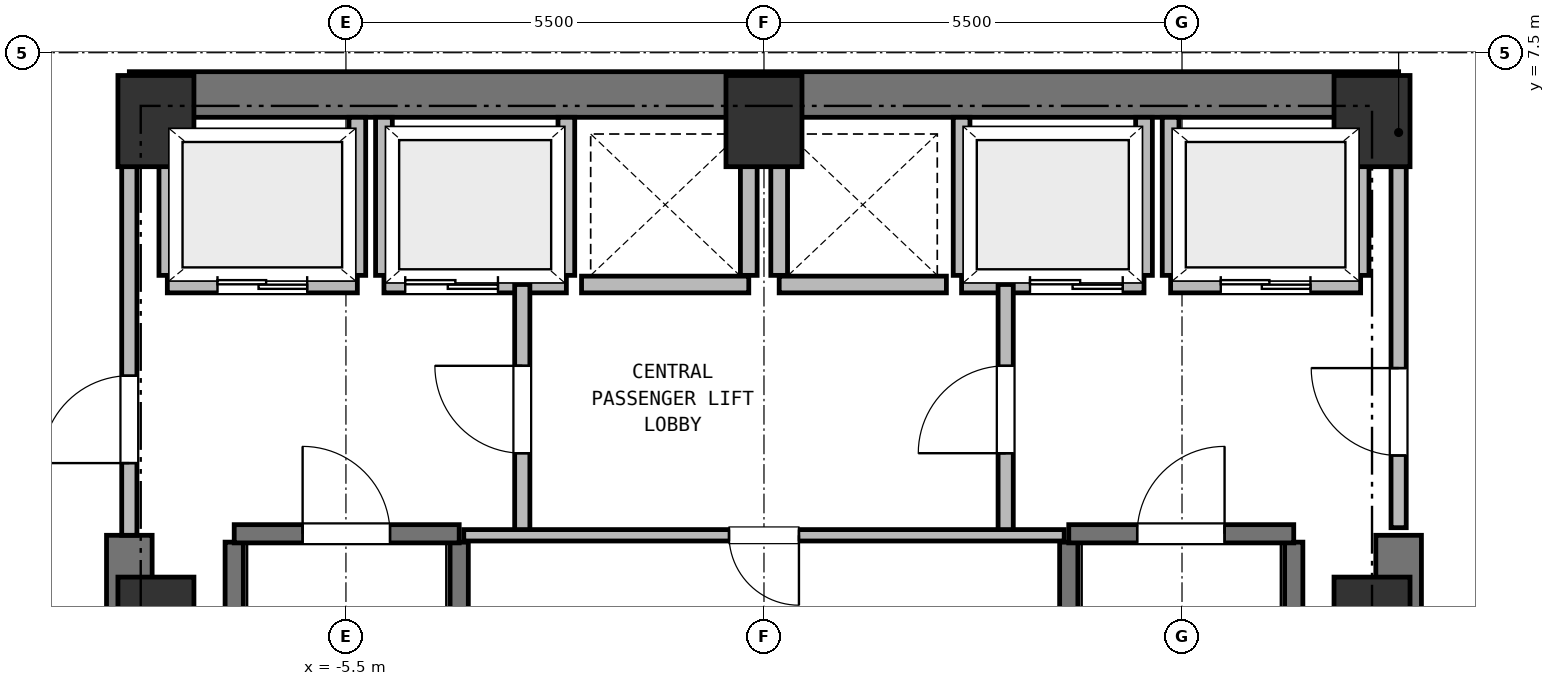
"""IFC4 building model, lengths in metres.
Left out: names, types, materials, properties, quantities, classifications, styles, units other than length and angle.
Written with IfcOpenShell. Run it as: python <this file> out.ifc"""

import sys

from ifc_helpers import new_model, si_unit, direction, frame, frame_2d, origin, origin_2d, place, context, subcontext, project, spatial, rectangle, extrude, element, fill, save


model = new_model("IFC4")
c1 = context("Model", 3, precision=1e-05, world=origin(), true_north=direction((0.0, 1.0)))
c2 = subcontext(c1, "Body", "Model", "MODEL_VIEW")
j1 = project(units=[si_unit("LENGTHUNIT", "METRE"), si_unit("PLANEANGLEUNIT", "RADIAN")], contexts=[c1])
p1 = place(None, origin())
s1 = spatial("IfcSite", under=j1, at=p1, CompositionType="ELEMENT")
p2 = place(p1, origin())
s2 = spatial("IfcBuilding", under=s1, at=p2, CompositionType="ELEMENT")
p3 = place(p2, frame((0.0, 0.0, 92.75)))
s3 = spatial("IfcBuildingStorey", under=s2, at=p3, CompositionType="ELEMENT", Elevation=92.75)
for number, where, z_axis, x_axis in (
    (1, (8.0, 0.0, 0.0), (0.0, 0.0, 1.0), (1.0, 0.0, 0.0)),
    (2, (8.0, 6.6, 0.0), (0.0, 0.0, 1.0), (1.0, 0.0, 0.0)),
    (3, (0.0, 6.6, 0.0), (0.0, 0.0, 1.0), (1.0, 0.0, 0.0)),
    (4, (-8.0, 6.6, 0.0), (0.0, 0.0, 1.0), (1.0, 0.0, 0.0)),
    (5, (-8.0, 0.0, 0.0), (0.0, 0.0, 1.0), (1.0, 0.0, 0.0)),
):
    element("IfcColumn", number, at=place(p3, frame(where, z_axis=z_axis, x_axis=x_axis)), inside=s3, PredefinedType="COLUMN", context=c2, shape_type="SweptSolid", body=[
        extrude(rectangle(XDim=1.0, YDim=1.2, at=origin_2d()), origin(), (0.0, 0.0, 1.0), 4.5),
    ])
p4 = place(p3, frame((-8.35, 6.95, 0.0), z_axis=(0.0, 0.0, 1.0), x_axis=(1.0, 0.0, 0.0)))
e6 = element("IfcWall", 6, at=p4, inside=s3, PredefinedType="SHEAR", context=c2, shape_type="SweptSolid", body=[
    extrude(rectangle(XDim=16.7, YDim=0.6, at=frame_2d((8.35, 0.0))), origin(), (0.0, 0.0, 1.0), 4.25),
])
for number, where, z_axis, x_axis in (
    (7, (-8.35, -6.95, 0.0), (0.0, 0.0, 1.0), (0.0, 1.0, 0.0)),
    (8, (8.35, -6.95, 0.0), (0.0, 0.0, 1.0), (0.0, 1.0, 0.0)),
):
    element("IfcWall", number, at=place(p3, frame(where, z_axis=z_axis, x_axis=x_axis)), inside=s3, PredefinedType="SHEAR", context=c2, shape_type="SweptSolid", body=[
        extrude(rectangle(XDim=8.1, YDim=0.6, at=frame_2d((4.05, 0.0))), origin(), (0.0, 0.0, 1.0), 4.25),
    ])
for number, where, z_axis, x_axis in (
    (9, (-6.97, -6.16, 0.0), (0.0, 0.0, 1.0), (0.0, 1.0, 0.0)),
    (10, (-4.01, -6.16, 0.0), (0.0, 0.0, 1.0), (0.0, 1.0, 0.0)),
):
    element("IfcWall", number, at=place(p3, frame(where, z_axis=z_axis, x_axis=x_axis)), inside=s3, PredefinedType="SHEAR", context=c2, shape_type="SweptSolid", body=[
        extrude(rectangle(XDim=7.22, YDim=0.24, at=frame_2d((3.61, 0.0))), origin(), (0.0, 0.0, 1.0), 4.25),
    ])
p5 = place(p3, frame((-6.97, 1.17, 0.0), z_axis=(0.0, 0.0, 1.0), x_axis=(1.0, 0.0, 0.0)))
e11 = element("IfcWall", 11, at=p5, inside=s3, PredefinedType="SHEAR", context=c2, shape_type="SweptSolid", body=[
    extrude(rectangle(XDim=2.96, YDim=0.24, at=frame_2d((1.48, 0.0))), origin(), (0.0, 0.0, 1.0), 4.25),
])
p6 = place(p5, frame((0.9, 0.0, 0.0)))
e12 = element("IfcOpeningElement", 12, at=p6, cuts=e11, PredefinedType="OPENING", context=c2, shape_type="SweptSolid", body=[
    extrude(rectangle(XDim=1.15, YDim=2.15, at=frame_2d((0.575, 1.075))), frame((0.0, 0.13, 0.0), z_axis=(0.0, -1.0, 0.0), x_axis=(1.0, 0.0, 0.0)), (0.0, 0.0, 1.0), 0.26),
])
for number, where, z_axis, x_axis in (
    (13, (4.01, -6.16, 0.0), (0.0, 0.0, 1.0), (0.0, 1.0, 0.0)),
    (14, (6.97, -6.16, 0.0), (0.0, 0.0, 1.0), (0.0, 1.0, 0.0)),
):
    element("IfcWall", number, at=place(p3, frame(where, z_axis=z_axis, x_axis=x_axis)), inside=s3, PredefinedType="SHEAR", context=c2, shape_type="SweptSolid", body=[
        extrude(rectangle(XDim=7.22, YDim=0.24, at=frame_2d((3.61, 0.0))), origin(), (0.0, 0.0, 1.0), 4.25),
    ])
p7 = place(p3, frame((4.01, 1.17, 0.0), z_axis=(0.0, 0.0, 1.0), x_axis=(1.0, 0.0, 0.0)))
e15 = element("IfcWall", 15, at=p7, inside=s3, PredefinedType="SHEAR", context=c2, shape_type="SweptSolid", body=[
    extrude(rectangle(XDim=2.96, YDim=0.24, at=frame_2d((1.48, 0.0))), origin(), (0.0, 0.0, 1.0), 4.25),
])
p8 = place(p7, frame((0.9, 0.0, 0.0)))
e16 = element("IfcOpeningElement", 16, at=p8, cuts=e15, PredefinedType="OPENING", context=c2, shape_type="SweptSolid", body=[
    extrude(rectangle(XDim=1.15, YDim=2.15, at=frame_2d((0.575, 1.075))), frame((0.0, 0.13, 0.0), z_axis=(0.0, -1.0, 0.0), x_axis=(1.0, 0.0, 0.0)), (0.0, 0.0, 1.0), 0.26),
])
p9 = place(p3, frame((-7.85, 4.45, 0.0), z_axis=(0.0, 0.0, 1.0), x_axis=(1.0, 0.0, 0.0)))
e17 = element("IfcWall", 17, at=p9, inside=s3, PredefinedType="PARTITIONING", context=c2, shape_type="SweptSolid", body=[
    extrude(rectangle(XDim=2.5, YDim=0.22, at=frame_2d((1.25, 0.0))), origin(), (0.0, 0.0, 1.0), 4.25),
])
p10 = place(p9, frame((0.66, 0.0, 0.0)))
e18 = element("IfcOpeningElement", 18, at=p10, cuts=e17, PredefinedType="OPENING", context=c2, shape_type="SweptSolid", body=[
    extrude(rectangle(XDim=1.18, YDim=2.15, at=frame_2d((0.59, 1.075))), frame((0.0, 0.12, 0.0), z_axis=(0.0, -1.0, 0.0), x_axis=(1.0, 0.0, 0.0)), (0.0, 0.0, 1.0), 0.24),
])
p11 = place(p3, frame((-7.85, 4.57, 0.0), z_axis=(0.0, 0.0, 1.0), x_axis=(0.0, 1.0, 0.0)))
e19 = element("IfcWall", 19, at=p11, inside=s3, PredefinedType="PARTITIONING", context=c2, shape_type="SweptSolid", body=[
    extrude(rectangle(XDim=2.08, YDim=0.22, at=frame_2d((1.04, 0.0))), origin(), (0.0, 0.0, 1.0), 3.87),
])
p12 = place(p3, frame((-5.35, 4.57, 0.0), z_axis=(0.0, 0.0, 1.0), x_axis=(0.0, 1.0, 0.0)))
e20 = element("IfcWall", 20, at=p12, inside=s3, PredefinedType="PARTITIONING", context=c2, shape_type="SweptSolid", body=[
    extrude(rectangle(XDim=2.08, YDim=0.22, at=frame_2d((1.04, 0.0))), origin(), (0.0, 0.0, 1.0), 4.25),
])
p13 = place(p3, frame((5.35, 4.45, 0.0), z_axis=(0.0, 0.0, 1.0), x_axis=(1.0, 0.0, 0.0)))
e21 = element("IfcWall", 21, at=p13, inside=s3, PredefinedType="PARTITIONING", context=c2, shape_type="SweptSolid", body=[
    extrude(rectangle(XDim=2.5, YDim=0.22, at=frame_2d((1.25, 0.0))), origin(), (0.0, 0.0, 1.0), 4.25),
])
p14 = place(p13, frame((0.66, 0.0, 0.0)))
e22 = element("IfcOpeningElement", 22, at=p14, cuts=e21, PredefinedType="OPENING", context=c2, shape_type="SweptSolid", body=[
    extrude(rectangle(XDim=1.18, YDim=2.15, at=frame_2d((0.59, 1.075))), frame((0.0, 0.12, 0.0), z_axis=(0.0, -1.0, 0.0), x_axis=(1.0, 0.0, 0.0)), (0.0, 0.0, 1.0), 0.24),
])
p15 = place(p3, frame((5.35, 4.57, 0.0), z_axis=(0.0, 0.0, 1.0), x_axis=(0.0, 1.0, 0.0)))
e23 = element("IfcWall", 23, at=p15, inside=s3, PredefinedType="PARTITIONING", context=c2, shape_type="SweptSolid", body=[
    extrude(rectangle(XDim=2.08, YDim=0.22, at=frame_2d((1.04, 0.0))), origin(), (0.0, 0.0, 1.0), 4.25),
])
p16 = place(p3, frame((7.85, 4.57, 0.0), z_axis=(0.0, 0.0, 1.0), x_axis=(0.0, 1.0, 0.0)))
e24 = element("IfcWall", 24, at=p16, inside=s3, PredefinedType="PARTITIONING", context=c2, shape_type="SweptSolid", body=[
    extrude(rectangle(XDim=2.08, YDim=0.22, at=frame_2d((1.04, 0.0))), origin(), (0.0, 0.0, 1.0), 3.87),
])
p17 = place(p3, frame((-5.0, 4.45, 0.0), z_axis=(0.0, 0.0, 1.0), x_axis=(1.0, 0.0, 0.0)))
e25 = element("IfcWall", 25, at=p17, inside=s3, PredefinedType="PARTITIONING", context=c2, shape_type="SweptSolid", body=[
    extrude(rectangle(XDim=2.4, YDim=0.22, at=frame_2d((1.2, 0.0))), origin(), (0.0, 0.0, 1.0), 4.25),
])
p18 = place(p17, frame((0.28, 0.0, 0.0)))
e26 = element("IfcOpeningElement", 26, at=p18, cuts=e25, PredefinedType="OPENING", context=c2, shape_type="SweptSolid", body=[
    extrude(rectangle(XDim=1.22, YDim=2.15, at=frame_2d((0.61, 1.075))), frame((0.0, 0.12, 0.0), z_axis=(0.0, -1.0, 0.0), x_axis=(1.0, 0.0, 0.0)), (0.0, 0.0, 1.0), 0.24),
])
for number, where, z_axis, x_axis in (
    (27, (-5.0, 4.57, 0.0), (0.0, 0.0, 1.0), (0.0, 1.0, 0.0)),
    (28, (-2.6, 4.57, 0.0), (0.0, 0.0, 1.0), (0.0, 1.0, 0.0)),
):
    element("IfcWall", number, at=place(p3, frame(where, z_axis=z_axis, x_axis=x_axis)), inside=s3, PredefinedType="PARTITIONING", context=c2, shape_type="SweptSolid", body=[
        extrude(rectangle(XDim=2.08, YDim=0.22, at=frame_2d((1.04, 0.0))), origin(), (0.0, 0.0, 1.0), 4.25),
    ])
p19 = place(p3, frame((2.6, 4.45, 0.0), z_axis=(0.0, 0.0, 1.0), x_axis=(1.0, 0.0, 0.0)))
e29 = element("IfcWall", 29, at=p19, inside=s3, PredefinedType="PARTITIONING", context=c2, shape_type="SweptSolid", body=[
    extrude(rectangle(XDim=2.4, YDim=0.22, at=frame_2d((1.2, 0.0))), origin(), (0.0, 0.0, 1.0), 4.25),
])
p20 = place(p19, frame((0.9, 0.0, 0.0)))
e30 = element("IfcOpeningElement", 30, at=p20, cuts=e29, PredefinedType="OPENING", context=c2, shape_type="SweptSolid", body=[
    extrude(rectangle(XDim=1.22, YDim=2.15, at=frame_2d((0.61, 1.075))), frame((0.0, 0.12, 0.0), z_axis=(0.0, -1.0, 0.0), x_axis=(1.0, 0.0, 0.0)), (0.0, 0.0, 1.0), 0.24),
])
for number, where, z_axis, x_axis in (
    (31, (2.6, 4.57, 0.0), (0.0, 0.0, 1.0), (0.0, 1.0, 0.0)),
    (32, (5.0, 4.57, 0.0), (0.0, 0.0, 1.0), (0.0, 1.0, 0.0)),
):
    element("IfcWall", number, at=place(p3, frame(where, z_axis=z_axis, x_axis=x_axis)), inside=s3, PredefinedType="PARTITIONING", context=c2, shape_type="SweptSolid", body=[
        extrude(rectangle(XDim=2.08, YDim=0.22, at=frame_2d((1.04, 0.0))), origin(), (0.0, 0.0, 1.0), 4.25),
    ])
p21 = place(p3, frame((-2.4, 4.45, 0.0), z_axis=(0.0, 0.0, 1.0), x_axis=(1.0, 0.0, 0.0)))
e33 = element("IfcWall", 33, at=p21, inside=s3, PredefinedType="PARTITIONING", context=c2, shape_type="SweptSolid", body=[
    extrude(rectangle(XDim=2.2, YDim=0.22, at=frame_2d((1.1, 0.0))), origin(), (0.0, 0.0, 1.0), 4.25),
])
p22 = place(p3, frame((-0.2, 4.57, 0.0), z_axis=(0.0, 0.0, 1.0), x_axis=(0.0, 1.0, 0.0)))
e34 = element("IfcWall", 34, at=p22, inside=s3, PredefinedType="PARTITIONING", context=c2, shape_type="SweptSolid", body=[
    extrude(rectangle(XDim=2.08, YDim=0.22, at=frame_2d((1.04, 0.0))), origin(), (0.0, 0.0, 1.0), 4.25),
])
p23 = place(p3, frame((0.2, 4.45, 0.0), z_axis=(0.0, 0.0, 1.0), x_axis=(1.0, 0.0, 0.0)))
e35 = element("IfcWall", 35, at=p23, inside=s3, PredefinedType="PARTITIONING", context=c2, shape_type="SweptSolid", body=[
    extrude(rectangle(XDim=2.2, YDim=0.22, at=frame_2d((1.1, 0.0))), origin(), (0.0, 0.0, 1.0), 4.25),
])
p24 = place(p3, frame((0.2, 4.57, 0.0), z_axis=(0.0, 0.0, 1.0), x_axis=(0.0, 1.0, 0.0)))
e36 = element("IfcWall", 36, at=p24, inside=s3, PredefinedType="PARTITIONING", context=c2, shape_type="SweptSolid", body=[
    extrude(rectangle(XDim=2.08, YDim=0.22, at=frame_2d((1.04, 0.0))), origin(), (0.0, 0.0, 1.0), 4.25),
])
p25 = place(p3, frame((-3.18, 1.15, 0.0), z_axis=(0.0, 0.0, 1.0), x_axis=(0.0, 1.0, 0.0)))
e37 = element("IfcWall", 37, at=p25, inside=s3, PredefinedType="PARTITIONING", context=c2, shape_type="SweptSolid", body=[
    extrude(rectangle(XDim=3.3, YDim=0.2, at=frame_2d((1.65, 0.0))), origin(), (0.0, 0.0, 1.0), 4.25),
])
p26 = place(p25, frame((1.08, 0.0, 0.0)))
e38 = element("IfcOpeningElement", 38, at=p26, cuts=e37, PredefinedType="OPENING", context=c2, shape_type="SweptSolid", body=[
    extrude(rectangle(XDim=1.15, YDim=2.15, at=frame_2d((0.575, 1.075))), frame((0.0, 0.11, 0.0), z_axis=(0.0, -1.0, 0.0), x_axis=(1.0, 0.0, 0.0)), (0.0, 0.0, 1.0), 0.22),
])
p27 = place(p3, frame((3.18, 1.15, 0.0), z_axis=(0.0, 0.0, 1.0), x_axis=(0.0, 1.0, 0.0)))
e39 = element("IfcWall", 39, at=p27, inside=s3, PredefinedType="PARTITIONING", context=c2, shape_type="SweptSolid", body=[
    extrude(rectangle(XDim=3.3, YDim=0.2, at=frame_2d((1.65, 0.0))), origin(), (0.0, 0.0, 1.0), 4.25),
])
p28 = place(p27, frame((1.08, 0.0, 0.0)))
e40 = element("IfcOpeningElement", 40, at=p28, cuts=e39, PredefinedType="OPENING", context=c2, shape_type="SweptSolid", body=[
    extrude(rectangle(XDim=1.15, YDim=2.15, at=frame_2d((0.575, 1.075))), frame((0.0, 0.11, 0.0), z_axis=(0.0, -1.0, 0.0), x_axis=(1.0, 0.0, 0.0)), (0.0, 0.0, 1.0), 0.22),
])
p29 = place(p3, frame((-8.35, 1.15, 0.0), z_axis=(0.0, 0.0, 1.0), x_axis=(0.0, 1.0, 0.0)))
e41 = element("IfcWall", 41, at=p29, inside=s3, PredefinedType="PARTITIONING", context=c2, shape_type="SweptSolid", body=[
    extrude(rectangle(XDim=5.4, YDim=0.2, at=frame_2d((2.7, 0.0))), origin(), (0.0, 0.0, 1.0), 4.25),
])
p30 = place(p29, frame((0.95, 0.0, 0.0)))
e42 = element("IfcOpeningElement", 42, at=p30, cuts=e41, PredefinedType="OPENING", context=c2, shape_type="SweptSolid", body=[
    extrude(rectangle(XDim=1.15, YDim=2.15, at=frame_2d((0.575, 1.075))), frame((0.0, 0.11, 0.0), z_axis=(0.0, -1.0, 0.0), x_axis=(1.0, 0.0, 0.0)), (0.0, 0.0, 1.0), 0.22),
])
p31 = place(p3, frame((8.35, 1.25, 0.0), z_axis=(0.0, 0.0, 1.0), x_axis=(0.0, 1.0, 0.0)))
e43 = element("IfcWall", 43, at=p31, inside=s3, PredefinedType="PARTITIONING", context=c2, shape_type="SweptSolid", body=[
    extrude(rectangle(XDim=5.3, YDim=0.2, at=frame_2d((2.65, 0.0))), origin(), (0.0, 0.0, 1.0), 4.25),
])
p32 = place(p31, frame((0.95, 0.0, 0.0)))
e44 = element("IfcOpeningElement", 44, at=p32, cuts=e43, PredefinedType="OPENING", context=c2, shape_type="SweptSolid", body=[
    extrude(rectangle(XDim=1.15, YDim=2.15, at=frame_2d((0.575, 1.075))), frame((0.0, 0.11, 0.0), z_axis=(0.0, -1.0, 0.0), x_axis=(1.0, 0.0, 0.0)), (0.0, 0.0, 1.0), 0.22),
])
p33 = place(p3, frame((3.95, 1.15, 0.0), z_axis=(0.0, 0.0, 1.0), x_axis=(-1.0, 0.0, 0.0)))
e45 = element("IfcWall", 45, at=p33, inside=s3, PredefinedType="PARTITIONING", context=c2, shape_type="SweptSolid", body=[
    extrude(rectangle(XDim=7.9, YDim=0.15, at=frame_2d((3.95, 0.0))), origin(), (0.0, 0.0, 1.0), 4.25),
])
p34 = place(p33, frame((3.49, 0.0, 0.0)))
e46 = element("IfcOpeningElement", 46, at=p34, cuts=e45, PredefinedType="OPENING", context=c2, shape_type="SweptSolid", body=[
    extrude(rectangle(XDim=0.92, YDim=2.05, at=frame_2d((0.46, 1.025))), frame((0.0, 0.085, 0.0), z_axis=(0.0, -1.0, 0.0), x_axis=(1.0, 0.0, 0.0)), (0.0, 0.0, 1.0), 0.17),
])
for number, where, z_axis, x_axis in (
    (47, (8.678, 9.272, 0.0), (0.0, 0.0, 1.0), (0.707, -0.707, 0.0)),
    (48, (-10.722, 7.228, 0.0), (0.0, 0.0, 1.0), (0.707, 0.707, 0.0)),
):
    element("IfcWall", number, at=place(p3, frame(where, z_axis=z_axis, x_axis=x_axis)), inside=s3, PredefinedType="PARTITIONING", context=c2, shape_type="SweptSolid", body=[
        extrude(rectangle(XDim=2.89, YDim=0.15, at=frame_2d((1.445, 0.0))), origin(), (0.0, 0.0, 1.0), 4.25),
    ])
p35 = place(p6, origin())
e49 = element("IfcDoor", 49, at=p35, inside=s3, OperationType="SINGLE_SWING_LEFT", PredefinedType="DOOR", context=c2, shape_type="SweptSolid", body=[
    extrude(rectangle(XDim=1.15, YDim=2.15, at=frame_2d((0.575, 1.075))), frame((0.0, 0.025, 0.0), z_axis=(0.0, -1.0, 0.0), x_axis=(1.0, 0.0, 0.0)), (0.0, 0.0, 1.0), 0.05),
])
fill(e12, e49)
p36 = place(p8, origin())
e50 = element("IfcDoor", 50, at=p36, inside=s3, OperationType="SINGLE_SWING_RIGHT", PredefinedType="DOOR", context=c2, shape_type="SweptSolid", body=[
    extrude(rectangle(XDim=1.15, YDim=2.15, at=frame_2d((0.575, 1.075))), frame((0.0, 0.025, 0.0), z_axis=(0.0, -1.0, 0.0), x_axis=(1.0, 0.0, 0.0)), (0.0, 0.0, 1.0), 0.05),
])
fill(e16, e50)
p37 = place(p10, origin())
e51 = element("IfcDoor", 51, at=p37, inside=s3, OperationType="DOUBLE_DOOR_SLIDING", PredefinedType="DOOR", context=c2, shape_type="SweptSolid", body=[
    extrude(rectangle(XDim=1.18, YDim=2.15, at=frame_2d((0.59, 1.075))), frame((0.0, 0.025, 0.0), z_axis=(0.0, -1.0, 0.0), x_axis=(1.0, 0.0, 0.0)), (0.0, 0.0, 1.0), 0.05),
])
fill(e18, e51)
p38 = place(p14, origin())
e52 = element("IfcDoor", 52, at=p38, inside=s3, OperationType="DOUBLE_DOOR_SLIDING", PredefinedType="DOOR", context=c2, shape_type="SweptSolid", body=[
    extrude(rectangle(XDim=1.18, YDim=2.15, at=frame_2d((0.59, 1.075))), frame((0.0, 0.025, 0.0), z_axis=(0.0, -1.0, 0.0), x_axis=(1.0, 0.0, 0.0)), (0.0, 0.0, 1.0), 0.05),
])
fill(e22, e52)
p39 = place(p18, origin())
e53 = element("IfcDoor", 53, at=p39, inside=s3, OperationType="DOUBLE_DOOR_SLIDING", PredefinedType="DOOR", context=c2, shape_type="SweptSolid", body=[
    extrude(rectangle(XDim=1.22, YDim=2.15, at=frame_2d((0.61, 1.075))), frame((0.0, 0.025, 0.0), z_axis=(0.0, -1.0, 0.0), x_axis=(1.0, 0.0, 0.0)), (0.0, 0.0, 1.0), 0.05),
])
fill(e26, e53)
p40 = place(p20, origin())
e54 = element("IfcDoor", 54, at=p40, inside=s3, OperationType="DOUBLE_DOOR_SLIDING", PredefinedType="DOOR", context=c2, shape_type="SweptSolid", body=[
    extrude(rectangle(XDim=1.22, YDim=2.15, at=frame_2d((0.61, 1.075))), frame((0.0, 0.025, 0.0), z_axis=(0.0, -1.0, 0.0), x_axis=(1.0, 0.0, 0.0)), (0.0, 0.0, 1.0), 0.05),
])
fill(e30, e54)
p41 = place(p26, origin())
e55 = element("IfcDoor", 55, at=p41, inside=s3, OperationType="SINGLE_SWING_RIGHT", PredefinedType="DOOR", context=c2, shape_type="SweptSolid", body=[
    extrude(rectangle(XDim=1.15, YDim=2.15, at=frame_2d((0.575, 1.075))), frame((0.0, 0.025, 0.0), z_axis=(0.0, -1.0, 0.0), x_axis=(1.0, 0.0, 0.0)), (0.0, 0.0, 1.0), 0.05),
])
fill(e38, e55)
p42 = place(p28, origin())
e56 = element("IfcDoor", 56, at=p42, inside=s3, OperationType="SINGLE_SWING_LEFT", PredefinedType="DOOR", context=c2, shape_type="SweptSolid", body=[
    extrude(rectangle(XDim=1.15, YDim=2.15, at=frame_2d((0.575, 1.075))), frame((0.0, 0.025, 0.0), z_axis=(0.0, -1.0, 0.0), x_axis=(1.0, 0.0, 0.0)), (0.0, 0.0, 1.0), 0.05),
])
fill(e40, e56)
p43 = place(p30, origin())
e57 = element("IfcDoor", 57, at=p43, inside=s3, OperationType="SINGLE_SWING_LEFT", PredefinedType="DOOR", context=c2, shape_type="SweptSolid", body=[
    extrude(rectangle(XDim=1.15, YDim=2.15, at=frame_2d((0.575, 1.075))), frame((0.0, 0.025, 0.0), z_axis=(0.0, -1.0, 0.0), x_axis=(1.0, 0.0, 0.0)), (0.0, 0.0, 1.0), 0.05),
])
fill(e42, e57)
p44 = place(p32, origin())
e58 = element("IfcDoor", 58, at=p44, inside=s3, OperationType="SINGLE_SWING_RIGHT", PredefinedType="DOOR", context=c2, shape_type="SweptSolid", body=[
    extrude(rectangle(XDim=1.15, YDim=2.15, at=frame_2d((0.575, 1.075))), frame((0.0, 0.025, 0.0), z_axis=(0.0, -1.0, 0.0), x_axis=(1.0, 0.0, 0.0)), (0.0, 0.0, 1.0), 0.05),
])
fill(e44, e58)
p45 = place(p34, origin())
e59 = element("IfcDoor", 59, at=p45, inside=s3, OperationType="SINGLE_SWING_LEFT", PredefinedType="DOOR", context=c2, shape_type="SweptSolid", body=[
    extrude(rectangle(XDim=0.92, YDim=2.05, at=frame_2d((0.46, 1.025))), frame((0.0, 0.025, 0.0), z_axis=(0.0, -1.0, 0.0), x_axis=(1.0, 0.0, 0.0)), (0.0, 0.0, 1.0), 0.05),
])
fill(e46, e59)
save(model, sys.argv[1])
